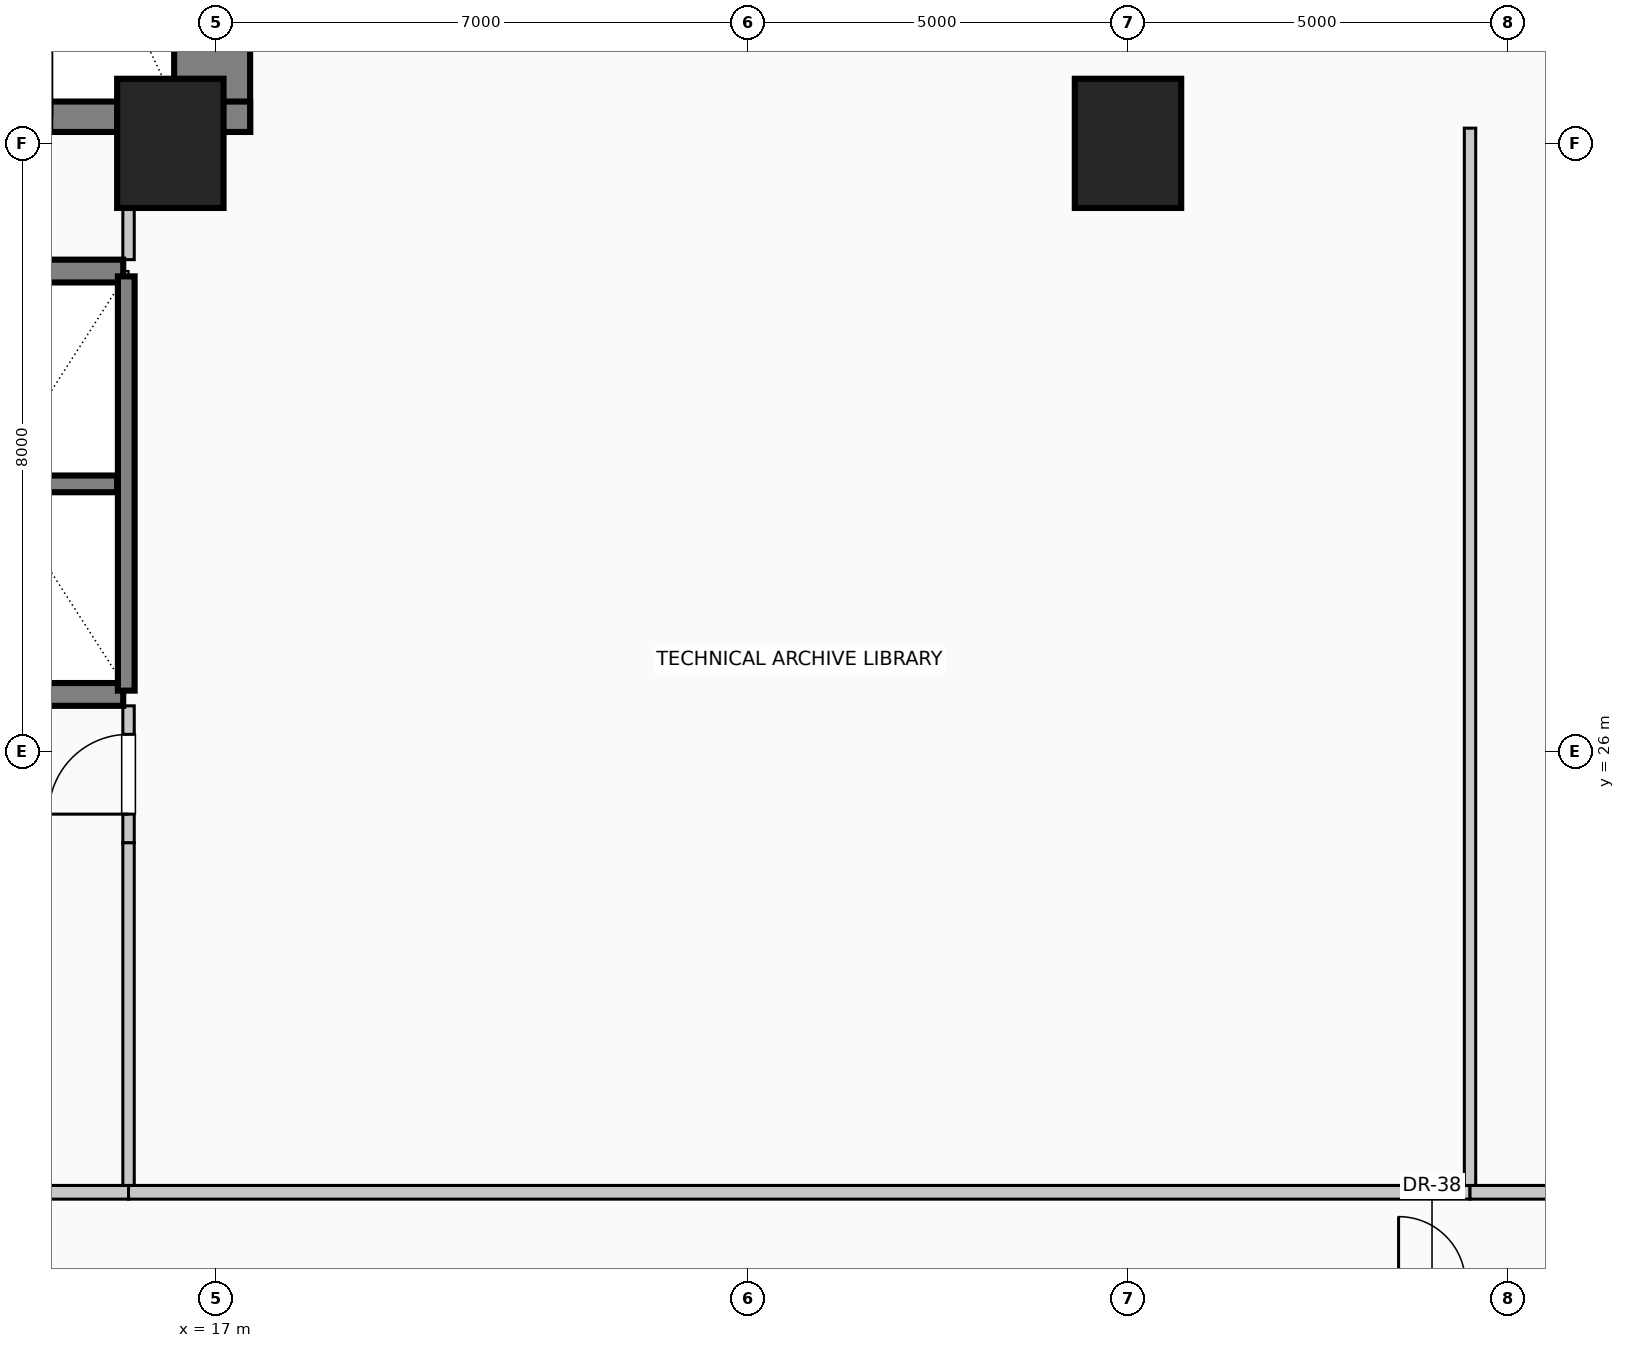
"""IFC4 building model, lengths in metres.
Left out: names, types, materials, properties, quantities, classifications, styles, units other than length and angle.
Written with IfcOpenShell. Run it as: python <this file> out.ifc"""

import sys

from ifc_helpers import new_model, si_unit, direction, frame, frame_2d, origin, origin_2d, place, context, subcontext, project, spatial, rectangle, extrude, element, fill, save


model = new_model("IFC4")
c1 = context("Model", 3, precision=1e-05, world=origin(), true_north=direction((0.0, 1.0)))
c2 = subcontext(c1, "Body", "Model", "MODEL_VIEW")
j1 = project(units=[si_unit("LENGTHUNIT", "METRE"), si_unit("PLANEANGLEUNIT", "RADIAN")], contexts=[c1])
p1 = place(None, origin())
s1 = spatial("IfcSite", under=j1, at=p1, CompositionType="ELEMENT")
p2 = place(p1, origin())
s2 = spatial("IfcBuilding", under=s1, at=p2, CompositionType="ELEMENT")
p3 = place(p2, frame((0.0, 0.0, 17.55)))
s3 = spatial("IfcBuildingStorey", under=s2, at=p3, CompositionType="ELEMENT", Elevation=17.55)
p4 = place(p3, frame((16.95, 34.15, 0.0), z_axis=(0.0, 0.0, 1.0), x_axis=(0.0, 1.0, 0.0)))
e1 = element("IfcWall", 1, at=p4, inside=s3, PredefinedType="SHEAR", context=c2, shape_type="SweptSolid", body=[
    extrude(rectangle(XDim=9.28, YDim=1.0, at=frame_2d((4.64, 0.0))), origin(), (0.0, 0.0, 1.0), 5.05),
])
p5 = place(p3, frame((12.29, 34.35, 0.0), z_axis=(0.0, 0.0, 1.0), x_axis=(1.0, 0.0, 0.0)))
e2 = element("IfcWall", 2, at=p5, inside=s3, PredefinedType="SHEAR", context=c2, shape_type="SweptSolid", body=[
    extrude(rectangle(XDim=5.16, YDim=0.4, at=frame_2d((2.58, 0.0))), origin(), (0.0, 0.0, 1.0), 5.05),
])
p6 = place(p5, frame((1.4, 0.0, 0.0)))
e3 = element("IfcOpeningElement", 3, at=p6, cuts=e2, PredefinedType="OPENING", context=c2, shape_type="SweptSolid", body=[
    extrude(rectangle(XDim=1.15, YDim=2.2, at=frame_2d((0.575, 1.1))), frame((0.0, 0.21, 0.0), z_axis=(0.0, -1.0, 0.0), x_axis=(1.0, 0.0, 0.0)), (0.0, 0.0, 1.0), 0.42),
])
for number, where, z_axis, x_axis in (
    (4, (16.4, 34.0, 0.0), (0.0, 0.0, 1.0), (1.0, 0.0, 0.0)),
    (5, (29.0, 34.0, 0.0), (0.0, 0.0, 1.0), (1.0, 0.0, 0.0)),
):
    element("IfcColumn", number, at=place(p3, frame(where, z_axis=z_axis, x_axis=x_axis)), inside=s3, PredefinedType="COLUMN", context=c2, shape_type="SweptSolid", body=[
        extrude(rectangle(XDim=1.4, YDim=1.7, at=origin_2d()), origin(), (0.0, 0.0, 1.0), 5.05),
    ])
for number, where, z_axis, x_axis in (
    (6, (15.78, 26.75, 0.0), (0.0, 0.0, 1.0), (-1.0, 0.0, 0.0)),
    (7, (14.0, 32.32, 0.0), (0.0, 0.0, 1.0), (1.0, 0.0, 0.0)),
):
    element("IfcWall", number, at=place(p3, frame(where, z_axis=z_axis, x_axis=x_axis)), inside=s3, PredefinedType="SOLIDWALL", context=c2, shape_type="SweptSolid", body=[
        extrude(rectangle(XDim=1.78, YDim=0.3, at=frame_2d((0.89, 0.0))), origin(), (0.0, 0.0, 1.0), 5.05),
    ])
p7 = place(p3, frame((15.82, 26.8, 0.0), z_axis=(0.0, 0.0, 1.0), x_axis=(0.0, 1.0, 0.0)))
e8 = element("IfcWall", 8, at=p7, inside=s3, PredefinedType="SOLIDWALL", context=c2, shape_type="SweptSolid", body=[
    extrude(rectangle(XDim=5.45, YDim=0.22, at=frame_2d((2.725, 0.0))), origin(), (0.0, 0.0, 1.0), 5.05),
])
p8 = place(p3, frame((12.3, 29.52, 0.0), z_axis=(0.0, 0.0, 1.0), x_axis=(1.0, 0.0, 0.0)))
e9 = element("IfcWall", 9, at=p8, inside=s3, PredefinedType="SOLIDWALL", context=c2, shape_type="SweptSolid", body=[
    extrude(rectangle(XDim=3.4, YDim=0.22, at=frame_2d((1.7, 0.0))), origin(), (0.0, 0.0, 1.0), 5.05),
])
p9 = place(p3, frame((12.2, 20.2, 0.0), z_axis=(0.0, 0.0, 1.0), x_axis=(1.0, 0.0, 0.0)))
e10 = element("IfcWall", 10, at=p9, inside=s3, PredefinedType="PARTITIONING", context=c2, shape_type="SweptSolid", body=[
    extrude(rectangle(XDim=3.65, YDim=0.18, at=frame_2d((1.825, 0.0))), origin(), (0.0, 0.0, 1.0), 4.75),
])
p10 = place(p3, frame((15.85, 20.2, 0.0), z_axis=(0.0, 0.0, 1.0), x_axis=(1.0, 0.0, 0.0)))
e11 = element("IfcWall", 11, at=p10, inside=s3, PredefinedType="PARTITIONING", context=c2, shape_type="SweptSolid", body=[
    extrude(rectangle(XDim=17.65, YDim=0.18, at=frame_2d((8.825, 0.0))), origin(), (0.0, 0.0, 1.0), 4.75),
])
p11 = place(p3, frame((33.5, 20.2, 0.0), z_axis=(0.0, 0.0, 1.0), x_axis=(1.0, 0.0, 0.0)))
e12 = element("IfcWall", 12, at=p11, inside=s3, PredefinedType="PARTITIONING", context=c2, shape_type="SweptSolid", body=[
    extrude(rectangle(XDim=8.05, YDim=0.18, at=frame_2d((4.025, 0.0))), origin(), (0.0, 0.0, 1.0), 4.75),
])
p12 = place(p3, frame((15.85, 20.29, 0.0), z_axis=(0.0, 0.0, 1.0), x_axis=(0.0, 1.0, 0.0)))
e13 = element("IfcWall", 13, at=p12, inside=s3, PredefinedType="PARTITIONING", context=c2, shape_type="SweptSolid", body=[
    extrude(rectangle(XDim=4.51, YDim=0.15, at=frame_2d((2.255, 0.0))), origin(), (0.0, 0.0, 1.0), 3.145),
])
p13 = place(p3, frame((15.85, 24.8, 0.0), z_axis=(0.0, 0.0, 1.0), x_axis=(0.0, 1.0, 0.0)))
e14 = element("IfcWall", 14, at=p13, inside=s3, PredefinedType="PARTITIONING", context=c2, shape_type="SweptSolid", body=[
    extrude(rectangle(XDim=1.8, YDim=0.15, at=frame_2d((0.9, 0.0))), origin(), (0.0, 0.0, 1.0), 3.145),
])
p14 = place(p13, frame((0.375, 0.0, 0.0)))
e15 = element("IfcOpeningElement", 15, at=p14, cuts=e14, PredefinedType="OPENING", context=c2, shape_type="SweptSolid", body=[
    extrude(rectangle(XDim=1.05, YDim=2.15, at=frame_2d((0.525, 1.075))), frame((0.0, 0.085, 0.0), z_axis=(0.0, -1.0, 0.0), x_axis=(1.0, 0.0, 0.0)), (0.0, 0.0, 1.0), 0.17),
])
p15 = place(p3, frame((15.85, 32.47, 0.0), z_axis=(0.0, 0.0, 1.0), x_axis=(0.0, 1.0, 0.0)))
e16 = element("IfcWall", 16, at=p15, inside=s3, PredefinedType="PARTITIONING", context=c2, shape_type="SweptSolid", body=[
    extrude(rectangle(XDim=0.68, YDim=0.15, at=frame_2d((0.34, 0.0))), origin(), (0.0, 0.0, 1.0), 3.145),
])
p16 = place(p3, frame((33.5, 20.29, 0.0), z_axis=(0.0, 0.0, 1.0), x_axis=(0.0, 1.0, 0.0)))
e17 = element("IfcWall", 17, at=p16, inside=s3, PredefinedType="PARTITIONING", context=c2, shape_type="SweptSolid", body=[
    extrude(rectangle(XDim=13.91, YDim=0.15, at=frame_2d((6.955, 0.0))), origin(), (0.0, 0.0, 1.0), 4.75),
])
p17 = place(p14, origin())
e18 = element("IfcDoor", 18, at=p17, inside=s3, OperationType="SINGLE_SWING_LEFT", PredefinedType="DOOR", context=c2, shape_type="SweptSolid", body=[
    extrude(rectangle(XDim=1.05, YDim=2.15, at=frame_2d((0.525, 1.075))), frame((0.0, 0.025, 0.0), z_axis=(0.0, -1.0, 0.0), x_axis=(1.0, 0.0, 0.0)), (0.0, 0.0, 1.0), 0.05),
])
fill(e15, e18)
save(model, sys.argv[1])
